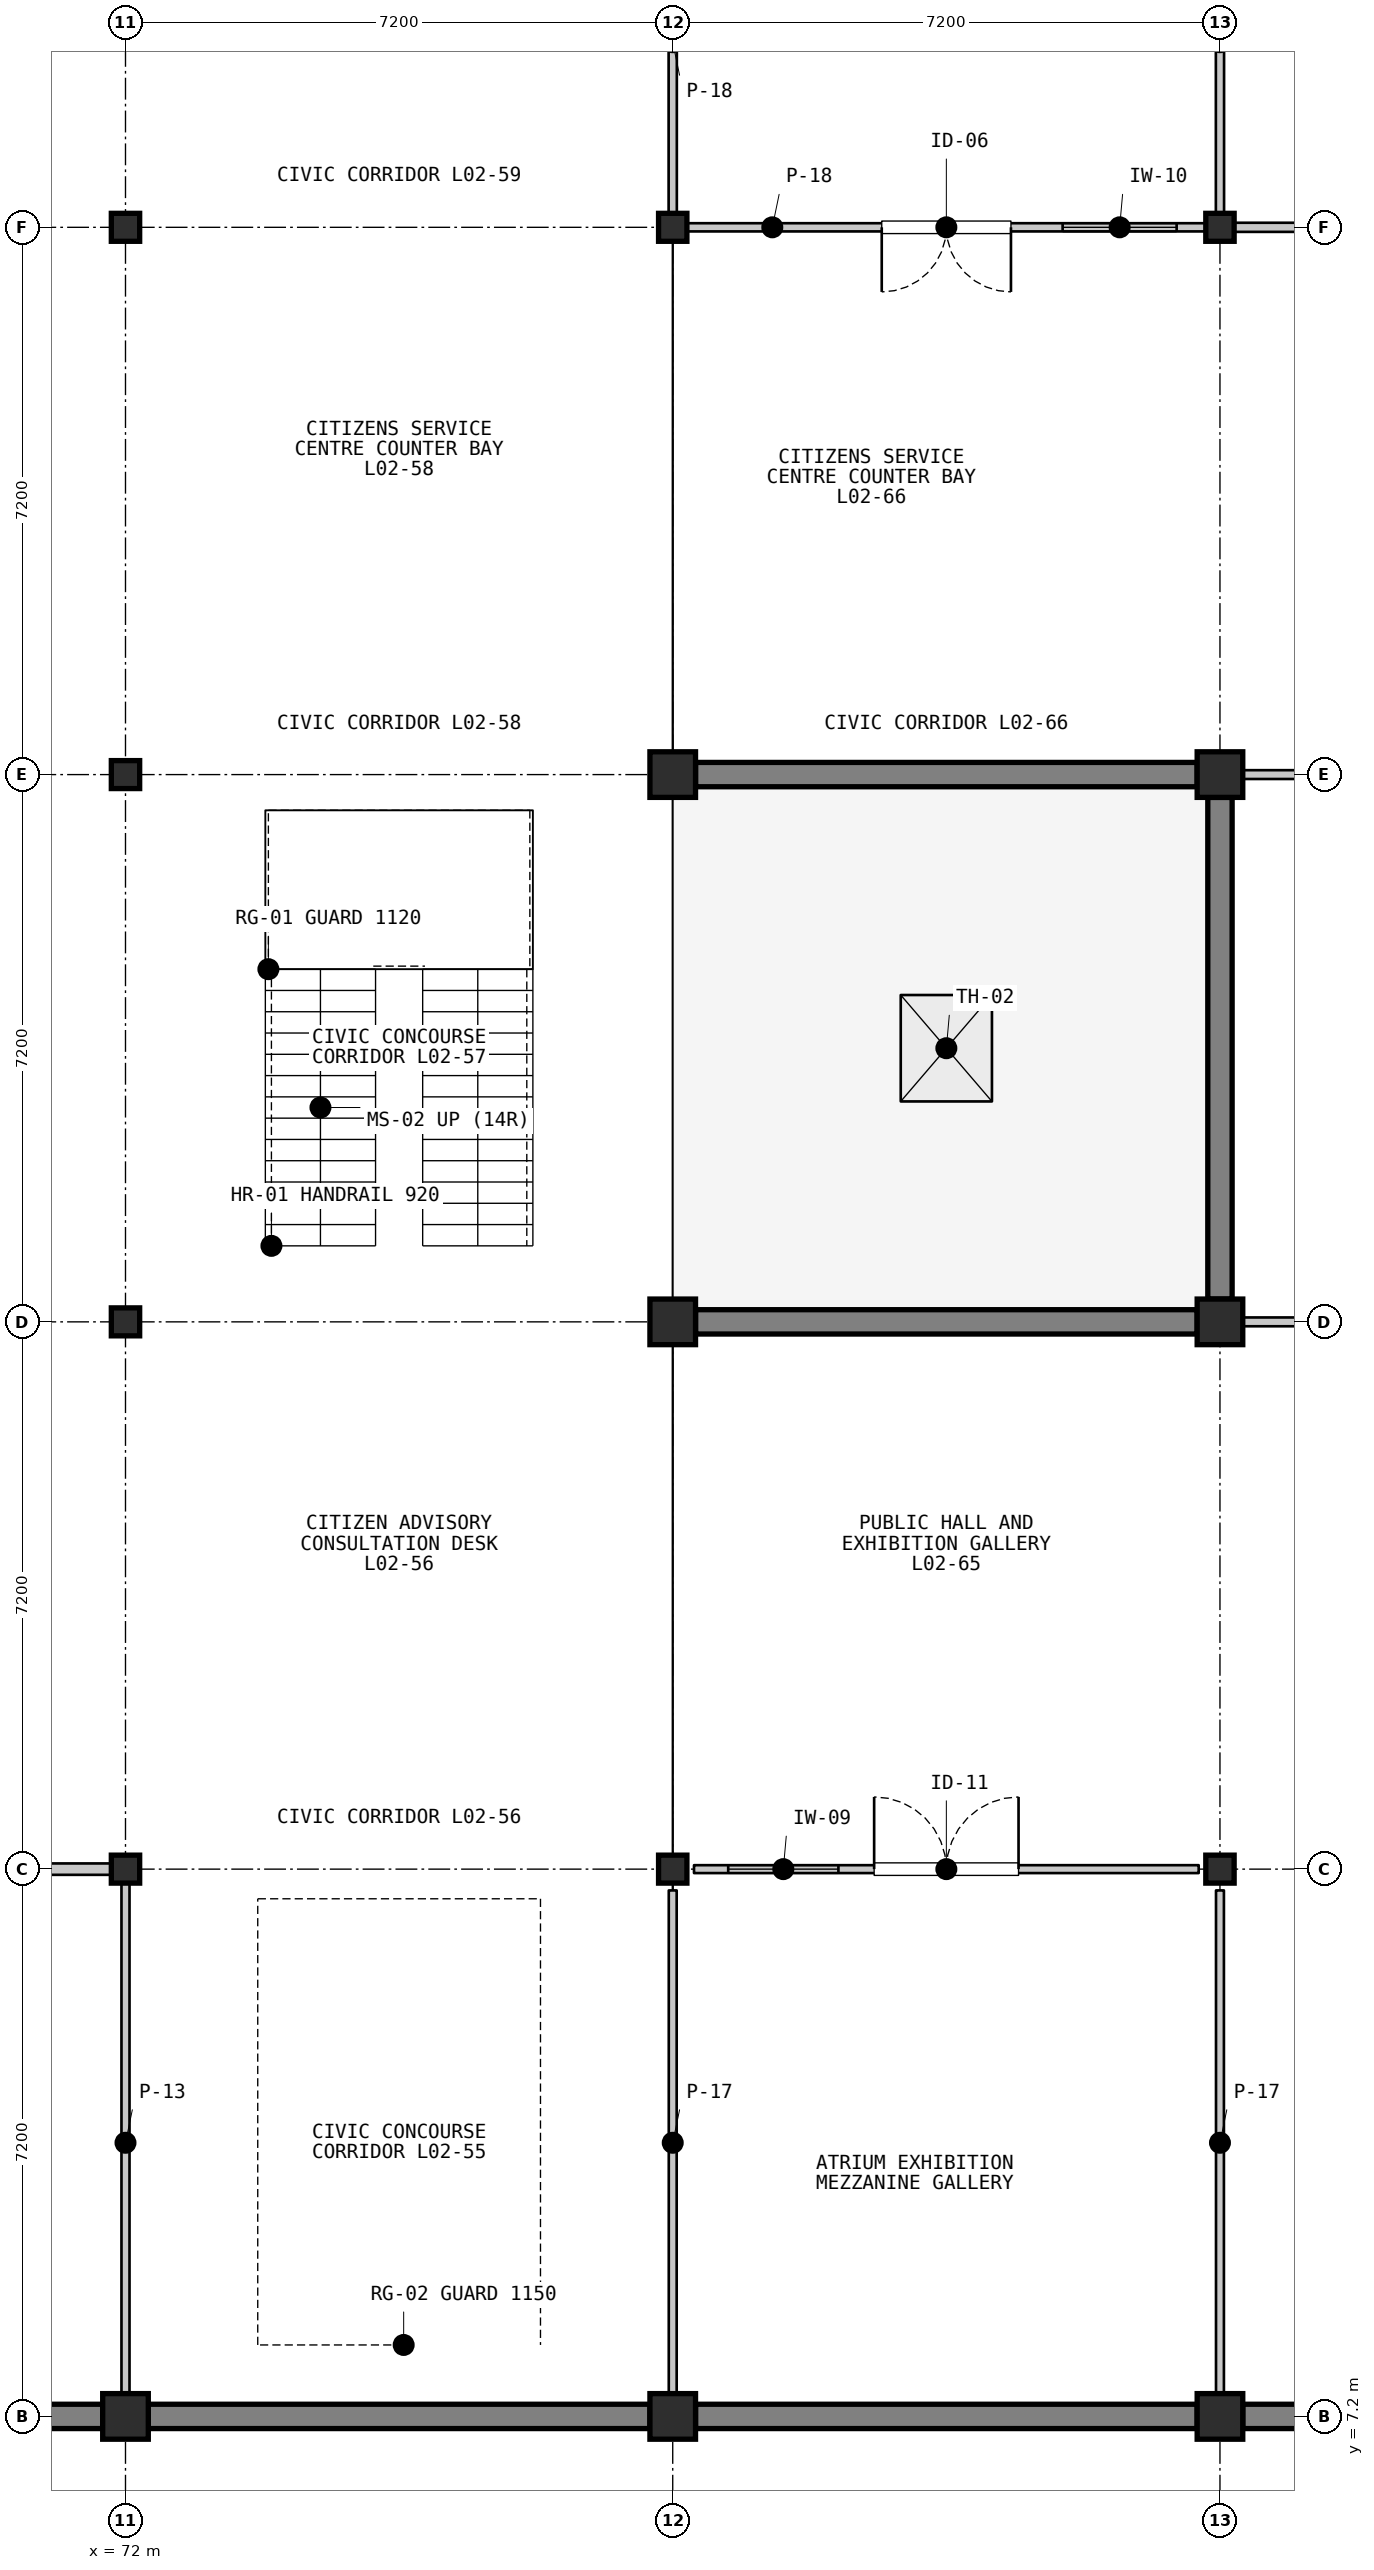
"""IFC4 building model, lengths in metres.
Left out: names, types, materials, properties, quantities, classifications, styles, units other than length and angle.
Written with IfcOpenShell. Run it as: python <this file> out.ifc"""

import sys

from ifc_helpers import new_model, si_unit, direction, frame, frame_2d, origin, origin_2d, place, context, subcontext, project, spatial, rectangle, i_section, extrude, element, fill, save


model = new_model("IFC4")
c1 = context("Model", 3, precision=1e-05, world=origin(), true_north=direction((0.0, 1.0)))
c2 = subcontext(c1, "Body", "Model", "MODEL_VIEW")
j1 = project(units=[si_unit("LENGTHUNIT", "METRE"), si_unit("PLANEANGLEUNIT", "RADIAN")], contexts=[c1])
p1 = place(None, origin())
s1 = spatial("IfcSite", under=j1, at=p1, CompositionType="ELEMENT")
p2 = place(p1, origin())
s2 = spatial("IfcBuilding", under=s1, at=p2, CompositionType="ELEMENT")
p3 = place(p2, frame((0.0, 0.0, 5.4)))
s3 = spatial("IfcBuildingStorey", under=s2, at=p3, CompositionType="ELEMENT", Elevation=5.4)
p4 = place(p3, frame((72.0, 7.2, 0.0), z_axis=(0.0, 0.0, 1.0), x_axis=(1.0, 0.0, 0.0)))
e1 = element("IfcColumn", 1, at=p4, inside=s3, PredefinedType="COLUMN", context=c2, shape_type="SweptSolid", body=[
    extrude(rectangle(XDim=0.6, YDim=0.6, at=origin_2d()), origin(), (0.0, 0.0, 1.0), 4.5),
])
for number, where, z_axis, x_axis in (
    (2, (72.0, 14.4, 0.0), (0.0, 0.0, 1.0), (1.0, 0.0, 0.0)),
    (3, (72.0, 21.6, 0.0), (0.0, 0.0, 1.0), (1.0, 0.0, 0.0)),
    (4, (72.0, 28.8, 0.0), (0.0, 0.0, 1.0), (1.0, 0.0, 0.0)),
    (5, (72.0, 36.0, 0.0), (0.0, 0.0, 1.0), (1.0, 0.0, 0.0)),
):
    element("IfcColumn", number, at=place(p3, frame(where, z_axis=z_axis, x_axis=x_axis)), inside=s3, PredefinedType="COLUMN", context=c2, shape_type="SweptSolid", body=[
        extrude(i_section(OverallWidth=0.373, OverallDepth=0.368, WebThickness=0.015, FlangeThickness=0.024, FilletRadius=0.015, at=origin_2d()), origin(), (0.0, 0.0, 1.0), 4.5),
    ])
p5 = place(p3, frame((79.2, 7.2, 0.0), z_axis=(0.0, 0.0, 1.0), x_axis=(1.0, 0.0, 0.0)))
e6 = element("IfcColumn", 6, at=p5, inside=s3, PredefinedType="COLUMN", context=c2, shape_type="SweptSolid", body=[
    extrude(rectangle(XDim=0.6, YDim=0.6, at=origin_2d()), origin(), (0.0, 0.0, 1.0), 4.5),
])
p6 = place(p3, frame((79.2, 14.4, 0.0), z_axis=(0.0, 0.0, 1.0), x_axis=(1.0, 0.0, 0.0)))
e7 = element("IfcColumn", 7, at=p6, inside=s3, PredefinedType="COLUMN", context=c2, shape_type="SweptSolid", body=[
    extrude(i_section(OverallWidth=0.373, OverallDepth=0.368, WebThickness=0.015, FlangeThickness=0.024, FilletRadius=0.015, at=origin_2d()), origin(), (0.0, 0.0, 1.0), 4.5),
])
for number, where, z_axis, x_axis in (
    (8, (79.2, 21.6, 0.0), (0.0, 0.0, 1.0), (1.0, 0.0, 0.0)),
    (9, (79.2, 28.8, 0.0), (0.0, 0.0, 1.0), (1.0, 0.0, 0.0)),
):
    element("IfcColumn", number, at=place(p3, frame(where, z_axis=z_axis, x_axis=x_axis)), inside=s3, PredefinedType="COLUMN", context=c2, shape_type="SweptSolid", body=[
        extrude(rectangle(XDim=0.6, YDim=0.6, at=origin_2d()), origin(), (0.0, 0.0, 1.0), 4.5),
    ])
p7 = place(p3, frame((79.2, 36.0, 0.0), z_axis=(0.0, 0.0, 1.0), x_axis=(1.0, 0.0, 0.0)))
e10 = element("IfcColumn", 10, at=p7, inside=s3, PredefinedType="COLUMN", context=c2, shape_type="SweptSolid", body=[
    extrude(i_section(OverallWidth=0.373, OverallDepth=0.368, WebThickness=0.015, FlangeThickness=0.024, FilletRadius=0.015, at=origin_2d()), origin(), (0.0, 0.0, 1.0), 4.5),
])
p8 = place(p3, frame((86.4, 7.2, 0.0), z_axis=(0.0, 0.0, 1.0), x_axis=(1.0, 0.0, 0.0)))
e11 = element("IfcColumn", 11, at=p8, inside=s3, PredefinedType="COLUMN", context=c2, shape_type="SweptSolid", body=[
    extrude(rectangle(XDim=0.6, YDim=0.6, at=origin_2d()), origin(), (0.0, 0.0, 1.0), 4.5),
])
p9 = place(p3, frame((86.4, 14.4, 0.0), z_axis=(0.0, 0.0, 1.0), x_axis=(1.0, 0.0, 0.0)))
e12 = element("IfcColumn", 12, at=p9, inside=s3, PredefinedType="COLUMN", context=c2, shape_type="SweptSolid", body=[
    extrude(i_section(OverallWidth=0.373, OverallDepth=0.368, WebThickness=0.015, FlangeThickness=0.024, FilletRadius=0.015, at=origin_2d()), origin(), (0.0, 0.0, 1.0), 4.5),
])
for number, where, z_axis, x_axis in (
    (13, (86.4, 21.6, 0.0), (0.0, 0.0, 1.0), (1.0, 0.0, 0.0)),
    (14, (86.4, 28.8, 0.0), (0.0, 0.0, 1.0), (1.0, 0.0, 0.0)),
):
    element("IfcColumn", number, at=place(p3, frame(where, z_axis=z_axis, x_axis=x_axis)), inside=s3, PredefinedType="COLUMN", context=c2, shape_type="SweptSolid", body=[
        extrude(rectangle(XDim=0.6, YDim=0.6, at=origin_2d()), origin(), (0.0, 0.0, 1.0), 4.5),
    ])
p10 = place(p3, frame((86.4, 36.0, 0.0), z_axis=(0.0, 0.0, 1.0), x_axis=(1.0, 0.0, 0.0)))
e15 = element("IfcColumn", 15, at=p10, inside=s3, PredefinedType="COLUMN", context=c2, shape_type="SweptSolid", body=[
    extrude(i_section(OverallWidth=0.373, OverallDepth=0.368, WebThickness=0.015, FlangeThickness=0.024, FilletRadius=0.015, at=origin_2d()), origin(), (0.0, 0.0, 1.0), 4.5),
])
for number, where, z_axis, x_axis in (
    (16, (71.7, 7.2, 0.0), (0.0, 0.0, 1.0), (-1.0, 0.0, 0.0)),
    (17, (78.9, 7.2, 0.0), (0.0, 0.0, 1.0), (-1.0, 0.0, 0.0)),
):
    element("IfcWall", number, at=place(p3, frame(where, z_axis=z_axis, x_axis=x_axis)), inside=s3, PredefinedType="SOLIDWALL", context=c2, shape_type="SweptSolid", body=[
        extrude(rectangle(XDim=6.6, YDim=0.32, at=frame_2d((3.3, 0.0))), origin(), (0.0, 0.0, 1.0), 3.698),
    ])
for number, where, z_axis, x_axis in (
    (18, (86.1, 7.2, 0.0), (0.0, 0.0, 1.0), (-1.0, 0.0, 0.0)),
    (19, (79.5, 21.6, 0.0), (0.0, 0.0, 1.0), (1.0, 0.0, 0.0)),
    (20, (86.1, 28.8, 0.0), (0.0, 0.0, 1.0), (-1.0, 0.0, 0.0)),
):
    element("IfcWall", number, at=place(p3, frame(where, z_axis=z_axis, x_axis=x_axis)), inside=s3, PredefinedType="SOLIDWALL", context=c2, shape_type="SweptSolid", body=[
        extrude(rectangle(XDim=6.6, YDim=0.32, at=frame_2d((3.3, 0.0))), origin(), (0.0, 0.0, 1.0), 3.698),
    ])
p11 = place(p3, frame((93.3, 7.2, 0.0), z_axis=(0.0, 0.0, 1.0), x_axis=(-1.0, 0.0, 0.0)))
e21 = element("IfcWall", 21, at=p11, inside=s3, PredefinedType="SOLIDWALL", context=c2, shape_type="SweptSolid", body=[
    extrude(rectangle(XDim=6.6, YDim=0.32, at=frame_2d((3.3, 0.0))), origin(), (0.0, 0.0, 1.0), 3.698),
])
p12 = place(p11, frame((0.884, 0.0, 0.95)))
e22 = element("IfcOpeningElement", 22, at=p12, cuts=e21, PredefinedType="OPENING", context=c2, shape_type="SweptSolid", body=[
    extrude(rectangle(XDim=1.4, YDim=2.1, at=frame_2d((0.7, 1.05))), frame((0.0, 0.17, 0.0), z_axis=(0.0, -1.0, 0.0), x_axis=(1.0, 0.0, 0.0)), (0.0, 0.0, 1.0), 0.34),
])
p13 = place(p11, frame((4.316, 0.0, 0.95)))
e23 = element("IfcOpeningElement", 23, at=p13, cuts=e21, PredefinedType="OPENING", context=c2, shape_type="SweptSolid", body=[
    extrude(rectangle(XDim=1.4, YDim=2.1, at=frame_2d((0.7, 1.05))), frame((0.0, 0.17, 0.0), z_axis=(0.0, -1.0, 0.0), x_axis=(1.0, 0.0, 0.0)), (0.0, 0.0, 1.0), 0.34),
])
p14 = place(p3, frame((86.4, 21.9, 0.0), z_axis=(0.0, 0.0, 1.0), x_axis=(0.0, 1.0, 0.0)))
e24 = element("IfcWall", 24, at=p14, inside=s3, PredefinedType="SOLIDWALL", context=c2, shape_type="SweptSolid", body=[
    extrude(rectangle(XDim=6.6, YDim=0.32, at=frame_2d((3.3, 0.0))), origin(), (0.0, 0.0, 1.0), 3.767),
])
p15 = place(p3, frame((64.92, 14.4, 0.0), z_axis=(0.0, 0.0, 1.0), x_axis=(1.0, 0.0, 0.0)))
e25 = element("IfcWall", 25, at=p15, inside=s3, PredefinedType="PARTITIONING", context=c2, shape_type="SweptSolid", body=[
    extrude(rectangle(XDim=6.96, YDim=0.15, at=frame_2d((3.48, 0.0))), origin(), (0.0, 0.0, 1.0), 3.688),
])
p16 = place(p15, frame((2.555, 0.0, 0.0)))
e26 = element("IfcOpeningElement", 26, at=p16, cuts=e25, PredefinedType="OPENING", context=c2, shape_type="SweptSolid", body=[
    extrude(rectangle(XDim=1.85, YDim=2.45, at=frame_2d((0.925, 1.225))), frame((0.0, 0.085, 0.0), z_axis=(0.0, -1.0, 0.0), x_axis=(1.0, 0.0, 0.0)), (0.0, 0.0, 1.0), 0.17),
])
p17 = place(p3, frame((72.0, 14.28, 0.0), z_axis=(0.0, 0.0, 1.0), x_axis=(0.0, -1.0, 0.0)))
e27 = element("IfcWall", 27, at=p17, inside=s3, PredefinedType="PARTITIONING", context=c2, shape_type="SweptSolid", body=[
    extrude(rectangle(XDim=6.96, YDim=0.106, at=frame_2d((3.48, 0.0))), origin(), (0.0, 0.0, 1.0), 3.688),
])
p18 = place(p3, frame((79.48, 14.4, 0.0), z_axis=(0.0, 0.0, 1.0), x_axis=(1.0, 0.0, 0.0)))
e28 = element("IfcWall", 28, at=p18, inside=s3, PredefinedType="PARTITIONING", context=c2, shape_type="SweptSolid", body=[
    extrude(rectangle(XDim=6.64, YDim=0.104, at=frame_2d((3.32, 0.0))), origin(), (0.0, 0.0, 1.0), 3.688),
])
p19 = place(p18, frame((2.37, 0.0, 0.0)))
e29 = element("IfcOpeningElement", 29, at=p19, cuts=e28, PredefinedType="OPENING", context=c2, shape_type="SweptSolid", body=[
    extrude(rectangle(XDim=1.9, YDim=2.45, at=frame_2d((0.95, 1.225))), frame((0.0, 0.062, 0.0), z_axis=(0.0, -1.0, 0.0), x_axis=(1.0, 0.0, 0.0)), (0.0, 0.0, 1.0), 0.124),
])
p20 = place(p18, frame((0.45, 0.0, 1.05)))
e30 = element("IfcOpeningElement", 30, at=p20, cuts=e28, PredefinedType="OPENING", context=c2, shape_type="SweptSolid", body=[
    extrude(rectangle(XDim=1.45, YDim=1.15, at=frame_2d((0.725, 0.575))), frame((0.0, 0.062, 0.0), z_axis=(0.0, -1.0, 0.0), x_axis=(1.0, 0.0, 0.0)), (0.0, 0.0, 1.0), 0.124),
])
for number, where, z_axis, x_axis in (
    (31, (79.2, 7.48, 0.0), (0.0, 0.0, 1.0), (0.0, 1.0, 0.0)),
    (32, (86.4, 14.12, 0.0), (0.0, 0.0, 1.0), (0.0, -1.0, 0.0)),
):
    element("IfcWall", number, at=place(p3, frame(where, z_axis=z_axis, x_axis=x_axis)), inside=s3, PredefinedType="PARTITIONING", context=c2, shape_type="SweptSolid", body=[
        extrude(rectangle(XDim=6.64, YDim=0.104, at=frame_2d((3.32, 0.0))), origin(), (0.0, 0.0, 1.0), 3.757),
    ])
p21 = place(p3, frame((86.28, 36.0, 0.0), z_axis=(0.0, 0.0, 1.0), x_axis=(-1.0, 0.0, 0.0)))
e33 = element("IfcWall", 33, at=p21, inside=s3, PredefinedType="PARTITIONING", context=c2, shape_type="SweptSolid", body=[
    extrude(rectangle(XDim=6.96, YDim=0.108, at=frame_2d((3.48, 0.0))), origin(), (0.0, 0.0, 1.0), 3.688),
])
p22 = place(p21, frame((2.63, 0.0, 0.0)))
e34 = element("IfcOpeningElement", 34, at=p22, cuts=e33, PredefinedType="OPENING", context=c2, shape_type="SweptSolid", body=[
    extrude(rectangle(XDim=1.7, YDim=2.35, at=frame_2d((0.85, 1.175))), frame((0.0, 0.064, 0.0), z_axis=(0.0, -1.0, 0.0), x_axis=(1.0, 0.0, 0.0)), (0.0, 0.0, 1.0), 0.128),
])
p23 = place(p21, frame((0.45, 0.0, 1.05)))
e35 = element("IfcOpeningElement", 35, at=p23, cuts=e33, PredefinedType="OPENING", context=c2, shape_type="SweptSolid", body=[
    extrude(rectangle(XDim=1.5, YDim=1.15, at=frame_2d((0.75, 0.575))), frame((0.0, 0.064, 0.0), z_axis=(0.0, -1.0, 0.0), x_axis=(1.0, 0.0, 0.0)), (0.0, 0.0, 1.0), 0.128),
])
for number, where, z_axis, x_axis in (
    (36, (79.2, 36.12, 0.0), (0.0, 0.0, 1.0), (0.0, 1.0, 0.0)),
    (37, (86.4, 42.92, 0.0), (0.0, 0.0, 1.0), (0.0, -1.0, 0.0)),
):
    element("IfcWall", number, at=place(p3, frame(where, z_axis=z_axis, x_axis=x_axis)), inside=s3, PredefinedType="PARTITIONING", context=c2, shape_type="SweptSolid", body=[
        extrude(rectangle(XDim=6.8, YDim=0.108, at=frame_2d((3.4, 0.0))), origin(), (0.0, 0.0, 1.0), 3.688),
    ])
p24 = place(p3, frame((93.32, 21.6, 0.0), z_axis=(0.0, 0.0, 1.0), x_axis=(-1.0, 0.0, 0.0)))
e38 = element("IfcWall", 38, at=p24, inside=s3, PredefinedType="PARTITIONING", context=c2, shape_type="SweptSolid", body=[
    extrude(rectangle(XDim=6.64, YDim=0.116, at=frame_2d((3.32, 0.0))), origin(), (0.0, 0.0, 1.0), 3.688),
])
p25 = place(p24, frame((2.395, 0.0, 0.0)))
e39 = element("IfcOpeningElement", 39, at=p25, cuts=e38, PredefinedType="OPENING", context=c2, shape_type="SweptSolid", body=[
    extrude(rectangle(XDim=1.85, YDim=2.45, at=frame_2d((0.925, 1.225))), frame((0.0, 0.068, 0.0), z_axis=(0.0, -1.0, 0.0), x_axis=(1.0, 0.0, 0.0)), (0.0, 0.0, 1.0), 0.136),
])
p26 = place(p24, frame((0.45, 0.0, 1.05)))
e40 = element("IfcOpeningElement", 40, at=p26, cuts=e38, PredefinedType="OPENING", context=c2, shape_type="SweptSolid", body=[
    extrude(rectangle(XDim=1.55, YDim=1.15, at=frame_2d((0.775, 0.575))), frame((0.0, 0.068, 0.0), z_axis=(0.0, -1.0, 0.0), x_axis=(1.0, 0.0, 0.0)), (0.0, 0.0, 1.0), 0.136),
])
p27 = place(p3, frame((86.68, 28.8, 0.0), z_axis=(0.0, 0.0, 1.0), x_axis=(1.0, 0.0, 0.0)))
e41 = element("IfcWall", 41, at=p27, inside=s3, PredefinedType="PARTITIONING", context=c2, shape_type="SweptSolid", body=[
    extrude(rectangle(XDim=6.64, YDim=0.116, at=frame_2d((3.32, 0.0))), origin(), (0.0, 0.0, 1.0), 3.688),
])
p28 = place(p3, frame((93.48, 36.0, 0.0), z_axis=(0.0, 0.0, 1.0), x_axis=(-1.0, 0.0, 0.0)))
e42 = element("IfcWall", 42, at=p28, inside=s3, PredefinedType="PARTITIONING", context=c2, shape_type="SweptSolid", body=[
    extrude(rectangle(XDim=6.96, YDim=0.12, at=frame_2d((3.48, 0.0))), origin(), (0.0, 0.0, 1.0), 3.688),
])
p29 = place(p28, frame((2.63, 0.0, 0.0)))
e43 = element("IfcOpeningElement", 43, at=p29, cuts=e42, PredefinedType="OPENING", context=c2, shape_type="SweptSolid", body=[
    extrude(rectangle(XDim=1.7, YDim=2.35, at=frame_2d((0.85, 1.175))), frame((0.0, 0.07, 0.0), z_axis=(0.0, -1.0, 0.0), x_axis=(1.0, 0.0, 0.0)), (0.0, 0.0, 1.0), 0.14),
])
p30 = place(p28, frame((0.45, 0.0, 1.05)))
e44 = element("IfcOpeningElement", 44, at=p30, cuts=e42, PredefinedType="OPENING", context=c2, shape_type="SweptSolid", body=[
    extrude(rectangle(XDim=1.65, YDim=1.15, at=frame_2d((0.825, 0.575))), frame((0.0, 0.07, 0.0), z_axis=(0.0, -1.0, 0.0), x_axis=(1.0, 0.0, 0.0)), (0.0, 0.0, 1.0), 0.14),
])
p31 = place(p3, frame((0.0, 0.0, -0.2)))
p32 = place(p31, frame((82.8, 25.2, 0.0)))
p33 = place(p32, frame((0.0, 0.0, 0.15)))
e45 = element("IfcDoor", 45, at=p33, inside=s3, OperationType="SINGLE_SWING_LEFT", PredefinedType="TRAPDOOR", context=c2, shape_type="SweptSolid", body=[
    extrude(rectangle(XDim=1.2, YDim=1.4, at=origin_2d()), origin(), (0.0, 0.0, 1.0), 0.05),
])
p34 = place(p19, origin())
e46 = element("IfcDoor", 46, at=p34, inside=s3, OperationType="DOUBLE_DOOR_SINGLE_SWING", PredefinedType="DOOR", context=c2, shape_type="SweptSolid", body=[
    extrude(rectangle(XDim=1.9, YDim=2.45, at=frame_2d((0.95, 1.225))), frame((0.0, 0.025, 0.0), z_axis=(0.0, -1.0, 0.0), x_axis=(1.0, 0.0, 0.0)), (0.0, 0.0, 1.0), 0.05),
])
fill(e29, e46)
p35 = place(p20, origin())
e47 = element("IfcWindow", 47, at=p35, inside=s3, PartitioningType="SINGLE_PANEL", PredefinedType="WINDOW", context=c2, shape_type="SweptSolid", body=[
    extrude(rectangle(XDim=1.45, YDim=1.15, at=frame_2d((0.725, 0.575))), frame((0.0, 0.03, 0.0), z_axis=(0.0, -1.0, 0.0), x_axis=(1.0, 0.0, 0.0)), (0.0, 0.0, 1.0), 0.06),
])
fill(e30, e47)
p36 = place(p22, origin())
e48 = element("IfcDoor", 48, at=p36, inside=s3, OperationType="DOUBLE_DOOR_SINGLE_SWING", PredefinedType="DOOR", context=c2, shape_type="SweptSolid", body=[
    extrude(rectangle(XDim=1.7, YDim=2.35, at=frame_2d((0.85, 1.175))), frame((0.0, 0.025, 0.0), z_axis=(0.0, -1.0, 0.0), x_axis=(1.0, 0.0, 0.0)), (0.0, 0.0, 1.0), 0.05),
])
fill(e34, e48)
p37 = place(p23, origin())
e49 = element("IfcWindow", 49, at=p37, inside=s3, PartitioningType="SINGLE_PANEL", PredefinedType="WINDOW", context=c2, shape_type="SweptSolid", body=[
    extrude(rectangle(XDim=1.5, YDim=1.15, at=frame_2d((0.75, 0.575))), frame((0.0, 0.03, 0.0), z_axis=(0.0, -1.0, 0.0), x_axis=(1.0, 0.0, 0.0)), (0.0, 0.0, 1.0), 0.06),
])
fill(e35, e49)
save(model, sys.argv[1])
